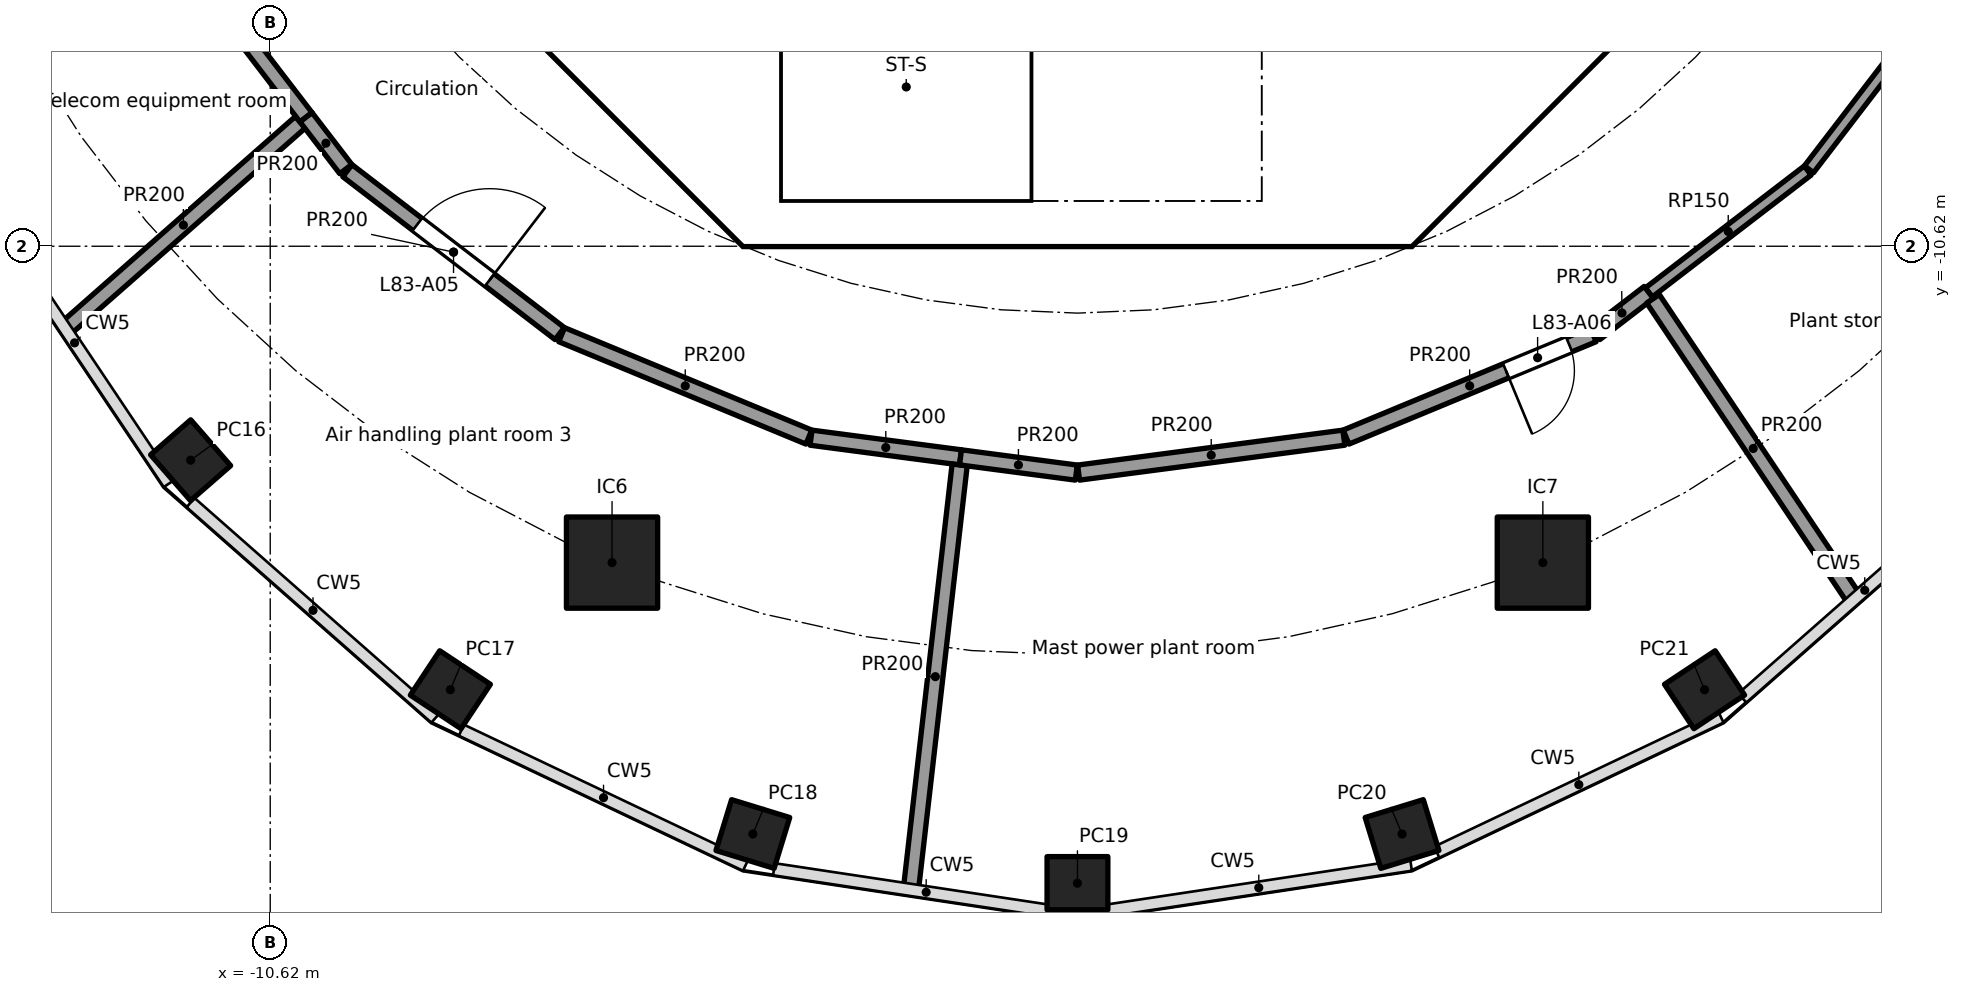
"""IFC4 building model, lengths in metres.
Left out: names, types, materials, properties, quantities, classifications, styles, units other than length and angle.
Written with IfcOpenShell. Run it as: python <this file> out.ifc"""

import sys

from ifc_helpers import new_model, si_unit, direction, frame, frame_2d, origin, origin_2d, place, context, subcontext, project, spatial, polyline, rectangle, hollow_rectangle, outline, extrude, element, fill, save


model = new_model("IFC4")
c1 = context("Model", 3, precision=1e-05, world=origin(), true_north=direction((0.0, 1.0)))
c2 = subcontext(c1, "Body", "Model", "MODEL_VIEW")
j1 = project(units=[si_unit("LENGTHUNIT", "METRE"), si_unit("PLANEANGLEUNIT", "RADIAN")], contexts=[c1])
p1 = place(None, origin())
s1 = spatial("IfcSite", under=j1, at=p1, CompositionType="ELEMENT")
p2 = place(p1, origin())
s2 = spatial("IfcBuilding", under=s1, at=p2, CompositionType="ELEMENT")
p3 = place(p2, frame((0.0, 0.0, 336.9)))
s3 = spatial("IfcBuildingStorey", under=s2, at=p3, CompositionType="ELEMENT", Elevation=336.9)
for number, where, z_axis, x_axis in (
    (1, (-11.667, -13.435, 0.0), (0.0, 0.0, 1.0), (0.657, -0.754, 0.0)),
    (2, (-8.25, -16.455, 0.0), (0.0, 0.0, 1.0), (0.834, -0.552, 0.0)),
    (3, (-4.271, -18.353, 0.0), (0.0, 0.0, 1.0), (0.956, -0.294, 0.0)),
    (4, (0.0, -19.0, 0.0), (0.0, 0.0, 1.0), (1.0, 0.0, 0.0)),
    (5, (4.271, -18.353, 0.0), (0.0, 0.0, 1.0), (0.956, 0.294, 0.0)),
    (6, (8.25, -16.455, 0.0), (0.0, 0.0, 1.0), (0.834, 0.552, 0.0)),
):
    element("IfcColumn", number, at=place(p3, frame(where, z_axis=z_axis, x_axis=x_axis)), inside=s3, PredefinedType="COLUMN", context=c2, shape_type="SweptSolid", body=[
        extrude(hollow_rectangle(XDim=0.8, YDim=0.7, WallThickness=0.025, at=origin_2d()), origin(), (0.0, 0.0, 1.0), 4.0),
    ])
for number, where, z_axis, x_axis in (
    (7, (-6.123, -14.782, 0.0), (0.0, 0.0, 1.0), (1.0, 0.0, 0.0)),
    (8, (6.123, -14.782, 0.0), (0.0, 0.0, 1.0), (1.0, 0.0, 0.0)),
):
    element("IfcColumn", number, at=place(p3, frame(where, z_axis=z_axis, x_axis=x_axis)), inside=s3, PredefinedType="COLUMN", context=c2, shape_type="SweptSolid", body=[
        extrude(rectangle(XDim=1.2, YDim=1.2, at=origin_2d()), origin(), (0.0, 0.0, 1.0), 4.0),
    ])
p4 = place(p3, frame((-9.988, -4.613, 0.0), z_axis=(0.0, 0.0, 1.0), x_axis=(0.707106781187, -0.707106781187, 0.0)))
e9 = element("IfcWall", 9, at=p4, inside=s3, PredefinedType="SHEAR", context=c2, shape_type="SweptSolid", body=[
    extrude(rectangle(XDim=7.602, YDim=0.6, at=frame_2d((3.801, 0.0))), origin(), (0.0, 0.0, 1.0), 3.7),
])
p5 = place(p4, frame((6.151, 0.0, 0.0)))
e10 = element("IfcOpeningElement", 10, at=p5, cuts=e9, PredefinedType="OPENING", context=c2, shape_type="SweptSolid", body=[
    extrude(rectangle(XDim=1.1, YDim=2.1, at=frame_2d((0.55, 1.05))), frame((0.0, 0.31, 0.0), z_axis=(0.0, -1.0, 0.0), x_axis=(1.0, 0.0, 0.0)), (0.0, 0.0, 1.0), 0.62),
])
p6 = place(p3, frame((4.613, -9.988, 0.0), z_axis=(0.0, 0.0, 1.0), x_axis=(0.707106781187, 0.707106781187, 0.0)))
e11 = element("IfcWall", 11, at=p6, inside=s3, PredefinedType="SHEAR", context=c2, shape_type="SweptSolid", body=[
    extrude(rectangle(XDim=7.602, YDim=0.6, at=frame_2d((3.801, 0.0))), origin(), (0.0, 0.0, 1.0), 3.7),
])
p7 = place(p6, frame((3.201, 0.0, 0.0)))
e12 = element("IfcOpeningElement", 12, at=p7, cuts=e11, PredefinedType="OPENING", context=c2, shape_type="SweptSolid", body=[
    extrude(rectangle(XDim=1.2, YDim=2.1, at=frame_2d((0.6, 1.05))), frame((0.0, 0.31, 0.0), z_axis=(0.0, -1.0, 0.0), x_axis=(1.0, 0.0, 0.0)), (0.0, 0.0, 1.0), 0.62),
])
p8 = place(p3, frame((4.0, -10.025, 0.0), z_axis=(0.0, 0.0, 1.0), x_axis=(0.0, 1.0, 0.0)))
e13 = element("IfcWall", 13, at=p8, inside=s3, PredefinedType="SOLIDWALL", context=c2, shape_type="SweptSolid", body=[
    extrude(rectangle(XDim=3.0, YDim=0.2, at=frame_2d((1.5, 0.0))), origin(), (0.0, 0.0, 1.0), 3.7),
])
p9 = place(p8, frame((0.975, 0.0, 0.0)))
e14 = element("IfcOpeningElement", 14, at=p9, cuts=e13, PredefinedType="OPENING", context=c2, shape_type="SweptSolid", body=[
    extrude(rectangle(XDim=1.1, YDim=2.1, at=frame_2d((0.55, 1.05))), frame((0.0, 0.11, 0.0), z_axis=(0.0, -1.0, 0.0), x_axis=(1.0, 0.0, 0.0)), (0.0, 0.0, 1.0), 0.22),
])
p10 = place(p3, origin())
e15 = element("IfcWall", 15, at=p10, inside=s3, PredefinedType="SHEAR", context=c2, shape_type="SweptSolid", body=[
    extrude(outline(polyline([(-4.152, -10.025), (4.152, -10.025), (4.401, -9.776), (4.825, -10.2), (4.401, -10.625), (-4.401, -10.625), (-4.825, -10.2), (-4.401, -9.776), (-4.152, -10.025)])), origin(), (0.0, 0.0, 1.0), 3.7),
])
p11 = place(p3, origin())
e16 = element("IfcWall", 16, at=p11, inside=s3, PredefinedType="SOLIDWALL", context=c2, shape_type="SweptSolid", body=[
    extrude(outline(polyline([(-3.9, -10.025), (-4.1, -10.025), (-4.1, -7.025), (-3.9, -7.025), (-3.9, -10.025)])), origin(), (0.0, 0.0, 1.0), 3.7),
])
p12 = place(p3, frame((9.607, -9.624, 0.0), z_axis=(0.0, 0.0, 1.0), x_axis=(-0.793381127635, -0.608725214126, 0.0)))
e17 = element("IfcWall", 17, at=p12, inside=s3, PredefinedType="PARTITIONING", context=c2, shape_type="SweptSolid", body=[
    extrude(rectangle(XDim=2.635, YDim=0.15, at=frame_2d((1.317, 0.0))), origin(), (0.0, 0.0, 1.0), 3.7),
])
p13 = place(p3, frame((11.771, -6.809, 0.0), z_axis=(0.0, 0.0, 1.0), x_axis=(-0.608736710054, -0.793372307201, 0.0)))
e18 = element("IfcWall", 18, at=p13, inside=s3, PredefinedType="PARTITIONING", context=c2, shape_type="SweptSolid", body=[
    extrude(rectangle(XDim=3.527, YDim=0.15, at=frame_2d((1.763, 0.0))), origin(), (0.0, 0.0, 1.0), 3.7),
])
p14 = place(p3, frame((-10.224, -8.989, 0.0), z_axis=(0.0, 0.0, 1.0), x_axis=(-0.750994766266, -0.660308156122, 0.0)))
e19 = element("IfcWall", 19, at=p14, inside=s3, PredefinedType="PARTITIONING", context=c2, shape_type="SweptSolid", body=[
    extrude(rectangle(XDim=4.097, YDim=0.2, at=frame_2d((2.049, 0.0))), origin(), (0.0, 0.0, 1.0), 3.7),
])
p15 = place(p3, frame((-10.149, -8.923, 0.0), z_axis=(0.0, 0.0, 1.0), x_axis=(-0.608699260048, 0.793401040343, 0.0)))
e20 = element("IfcWall", 20, at=p15, inside=s3, PredefinedType="PARTITIONING", context=c2, shape_type="SweptSolid", body=[
    extrude(rectangle(XDim=2.661, YDim=0.2, at=frame_2d((1.331, 0.0))), origin(), (0.0, 0.0, 1.0), 3.7),
])
p16 = place(p3, frame((-9.626, -9.605, 0.0), z_axis=(0.0, 0.0, 1.0), x_axis=(-0.608694005511, 0.793405071609, 0.0)))
e21 = element("IfcWall", 21, at=p16, inside=s3, PredefinedType="PARTITIONING", context=c2, shape_type="SweptSolid", body=[
    extrude(rectangle(XDim=0.859, YDim=0.2, at=frame_2d((0.43, 0.0))), origin(), (0.0, 0.0, 1.0), 3.7),
])
p17 = place(p3, frame((-6.812, -11.769, 0.0), z_axis=(0.0, 0.0, 1.0), x_axis=(-0.793402024283, 0.608697977542, 0.0)))
e22 = element("IfcWall", 22, at=p17, inside=s3, PredefinedType="PARTITIONING", context=c2, shape_type="SweptSolid", body=[
    extrude(rectangle(XDim=3.52, YDim=0.2, at=frame_2d((1.76, 0.0))), origin(), (0.0, 0.0, 1.0), 3.7),
])
p18 = place(p17, frame((1.16, 0.0, 0.0)))
e23 = element("IfcOpeningElement", 23, at=p18, cuts=e22, PredefinedType="OPENING", context=c2, shape_type="SweptSolid", body=[
    extrude(rectangle(XDim=1.2, YDim=2.1, at=frame_2d((0.6, 1.05))), frame((0.0, 0.11, 0.0), z_axis=(0.0, -1.0, 0.0), x_axis=(1.0, 0.0, 0.0)), (0.0, 0.0, 1.0), 0.22),
])
p19 = place(p3, frame((-3.534, -13.131, 0.0), z_axis=(0.0, 0.0, 1.0), x_axis=(-0.92386297064, 0.382723413813, 0.0)))
e24 = element("IfcWall", 24, at=p19, inside=s3, PredefinedType="PARTITIONING", context=c2, shape_type="SweptSolid", body=[
    extrude(rectangle(XDim=3.52, YDim=0.2, at=frame_2d((1.76, 0.0))), origin(), (0.0, 0.0, 1.0), 3.7),
])
p20 = place(p3, frame((-1.538, -13.397, 0.0), z_axis=(0.0, 0.0, 1.0), x_axis=(-0.991454295543, 0.130454512571, 0.0)))
e25 = element("IfcWall", 25, at=p20, inside=s3, PredefinedType="PARTITIONING", context=c2, shape_type="SweptSolid", body=[
    extrude(rectangle(XDim=1.984, YDim=0.2, at=frame_2d((0.992, 0.0))), origin(), (0.0, 0.0, 1.0), 3.7),
])
p21 = place(p3, frame((-1.55, -13.497, 0.0), z_axis=(0.0, 0.0, 1.0), x_axis=(-0.114057329834, -0.993474169524, 0.0)))
e26 = element("IfcWall", 26, at=p21, inside=s3, PredefinedType="PARTITIONING", context=c2, shape_type="SweptSolid", body=[
    extrude(rectangle(XDim=5.608, YDim=0.2, at=frame_2d((2.804, 0.0))), origin(), (0.0, 0.0, 1.0), 3.7),
])
p22 = place(p3, frame((-0.015, -13.598, 0.0), z_axis=(0.0, 0.0, 1.0), x_axis=(-0.991449967232, 0.13048740351, 0.0)))
e27 = element("IfcWall", 27, at=p22, inside=s3, PredefinedType="PARTITIONING", context=c2, shape_type="SweptSolid", body=[
    extrude(rectangle(XDim=1.536, YDim=0.2, at=frame_2d((0.768, 0.0))), origin(), (0.0, 0.0, 1.0), 3.7),
])
p23 = place(p3, frame((3.505, -13.139, 0.0), z_axis=(0.0, 0.0, 1.0), x_axis=(-0.991452406768, -0.130468866457, 0.0)))
e28 = element("IfcWall", 28, at=p23, inside=s3, PredefinedType="PARTITIONING", context=c2, shape_type="SweptSolid", body=[
    extrude(rectangle(XDim=3.52, YDim=0.2, at=frame_2d((1.76, 0.0))), origin(), (0.0, 0.0, 1.0), 3.7),
])
p24 = place(p3, frame((6.786, -11.784, 0.0), z_axis=(0.0, 0.0, 1.0), x_axis=(-0.92386297064, -0.382723413813, 0.0)))
e29 = element("IfcWall", 29, at=p24, inside=s3, PredefinedType="PARTITIONING", context=c2, shape_type="SweptSolid", body=[
    extrude(rectangle(XDim=3.52, YDim=0.2, at=frame_2d((1.76, 0.0))), origin(), (0.0, 0.0, 1.0), 3.7),
])
p25 = place(p24, frame((0.342, 0.0, 0.0)))
e30 = element("IfcOpeningElement", 30, at=p25, cuts=e29, PredefinedType="OPENING", context=c2, shape_type="SweptSolid", body=[
    extrude(rectangle(XDim=0.9, YDim=2.1, at=frame_2d((0.45, 1.05))), frame((0.0, 0.11, 0.0), z_axis=(0.0, -1.0, 0.0), x_axis=(1.0, 0.0, 0.0)), (0.0, 0.0, 1.0), 0.22),
])
p26 = place(p3, frame((7.517, -11.228, 0.0), z_axis=(0.0, 0.0, 1.0), x_axis=(-0.793420478802, -0.608673922407, 0.0)))
e31 = element("IfcWall", 31, at=p26, inside=s3, PredefinedType="PARTITIONING", context=c2, shape_type="SweptSolid", body=[
    extrude(rectangle(XDim=0.888, YDim=0.2, at=frame_2d((0.444, 0.0))), origin(), (0.0, 0.0, 1.0), 3.7),
])
p27 = place(p3, frame((10.209, -15.25, 0.0), z_axis=(0.0, 0.0, 1.0), x_axis=(-0.55629198168, 0.830986901893, 0.0)))
e32 = element("IfcWall", 32, at=p27, inside=s3, PredefinedType="PARTITIONING", context=c2, shape_type="SweptSolid", body=[
    extrude(rectangle(XDim=4.74, YDim=0.2, at=frame_2d((2.37, 0.0))), origin(), (0.0, 0.0, 1.0), 3.7),
])
p28 = place(p9, origin())
e33 = element("IfcDoor", 33, at=p28, inside=s3, OperationType="SINGLE_SWING_LEFT", PredefinedType="DOOR", context=c2, shape_type="SweptSolid", body=[
    extrude(rectangle(XDim=1.1, YDim=2.1, at=frame_2d((0.55, 1.05))), frame((0.0, 0.025, 0.0), z_axis=(0.0, -1.0, 0.0), x_axis=(1.0, 0.0, 0.0)), (0.0, 0.0, 1.0), 0.05),
])
fill(e14, e33)
p29 = place(p5, origin())
e34 = element("IfcDoor", 34, at=p29, inside=s3, OperationType="SINGLE_SWING_RIGHT", PredefinedType="DOOR", context=c2, shape_type="SweptSolid", body=[
    extrude(rectangle(XDim=1.1, YDim=2.1, at=frame_2d((0.55, 1.05))), frame((0.0, 0.025, 0.0), z_axis=(0.0, -1.0, 0.0), x_axis=(1.0, 0.0, 0.0)), (0.0, 0.0, 1.0), 0.05),
])
fill(e10, e34)
p30 = place(p18, frame((1.2, 0.0, 0.0), x_axis=(-1.0, 0.0, 0.0)))
e35 = element("IfcDoor", 35, at=p30, inside=s3, OperationType="SINGLE_SWING_RIGHT", PredefinedType="DOOR", context=c2, shape_type="SweptSolid", body=[
    extrude(rectangle(XDim=1.2, YDim=2.1, at=frame_2d((0.6, 1.05))), frame((0.0, 0.025, 0.0), z_axis=(0.0, -1.0, 0.0), x_axis=(1.0, 0.0, 0.0)), (0.0, 0.0, 1.0), 0.05),
])
fill(e23, e35)
p31 = place(p25, origin())
e36 = element("IfcDoor", 36, at=p31, inside=s3, OperationType="SINGLE_SWING_RIGHT", PredefinedType="DOOR", context=c2, shape_type="SweptSolid", body=[
    extrude(rectangle(XDim=0.9, YDim=2.1, at=frame_2d((0.45, 1.05))), frame((0.0, 0.025, 0.0), z_axis=(0.0, -1.0, 0.0), x_axis=(1.0, 0.0, 0.0)), (0.0, 0.0, 1.0), 0.05),
])
fill(e30, e36)
save(model, sys.argv[1])
